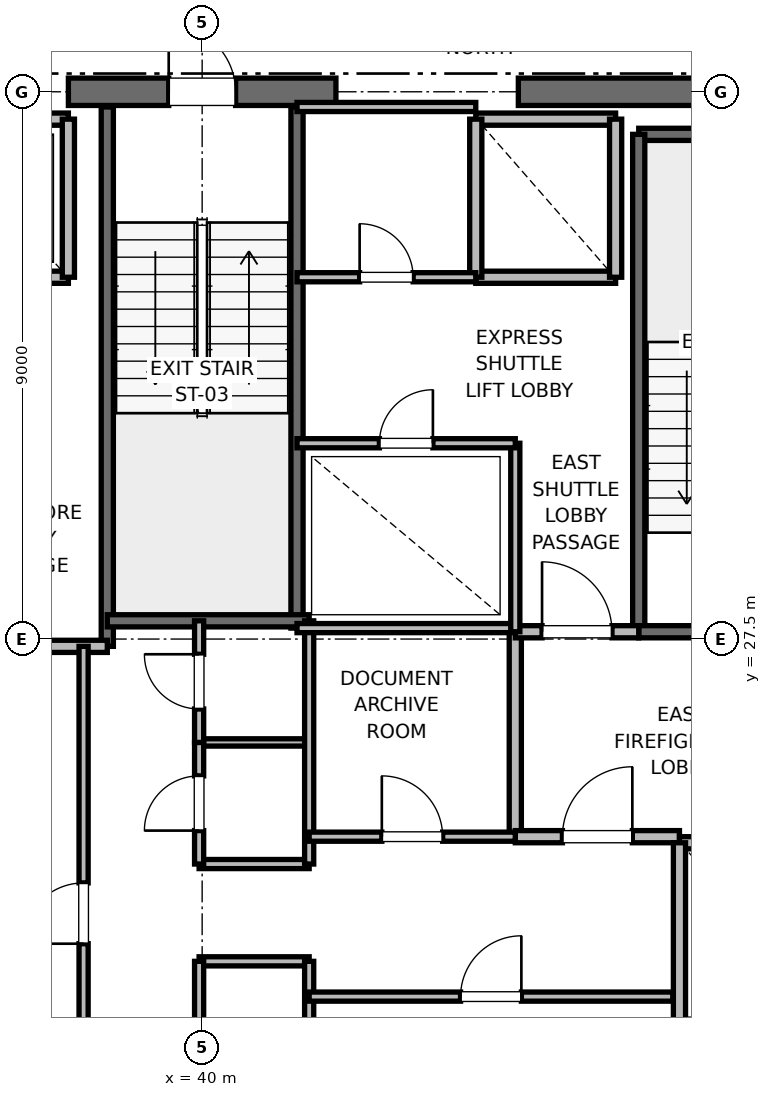
"""IFC4 building model, lengths in metres.
Left out: names, types, materials, properties, quantities, classifications, styles, units other than length and angle.
Written with IfcOpenShell. Run it as: python <this file> out.ifc"""

import sys

from ifc_helpers import new_model, si_unit, direction, frame, frame_2d, origin, place, context, subcontext, project, spatial, rectangle, extrude, element, fill, save


model = new_model("IFC4")
c1 = context("Model", 3, precision=1e-05, world=origin(), true_north=direction((0.0, 1.0)))
c2 = subcontext(c1, "Body", "Model", "MODEL_VIEW")
j1 = project(units=[si_unit("LENGTHUNIT", "METRE"), si_unit("PLANEANGLEUNIT", "RADIAN")], contexts=[c1])
p1 = place(None, origin())
s1 = spatial("IfcSite", under=j1, at=p1, CompositionType="ELEMENT")
p2 = place(p1, origin())
s2 = spatial("IfcBuilding", under=s1, at=p2, CompositionType="ELEMENT")
p3 = place(p2, frame((0.0, 0.0, 287.2)))
s3 = spatial("IfcBuildingStorey", under=s2, at=p3, CompositionType="ELEMENT", Elevation=287.2)
p4 = place(p3, frame((37.8, 36.5, 0.0), z_axis=(0.0, 0.0, 1.0), x_axis=(1.0, 0.0, 0.0)))
e1 = element("IfcWall", 1, at=p4, inside=s3, PredefinedType="SHEAR", context=c2, shape_type="SweptSolid", body=[
    extrude(rectangle(XDim=4.4, YDim=0.45, at=frame_2d((2.2, 0.0))), origin(), (0.0, 0.0, 1.0), 3.785),
])
p5 = place(p4, frame((1.65, 0.0, 0.0)))
e2 = element("IfcOpeningElement", 2, at=p5, cuts=e1, PredefinedType="OPENING", context=c2, shape_type="SweptSolid", body=[
    extrude(rectangle(XDim=1.1, YDim=2.15, at=frame_2d((0.55, 1.075))), frame((0.0, 0.225, 0.0), z_axis=(0.0, -1.0, 0.0), x_axis=(1.0, 0.0, 0.0)), (0.0, 0.0, 1.0), 0.45),
])
p6 = place(p3, frame((45.2, 36.5, 0.0), z_axis=(0.0, 0.0, 1.0), x_axis=(1.0, 0.0, 0.0)))
e3 = element("IfcWall", 3, at=p6, inside=s3, PredefinedType="SHEAR", context=c2, shape_type="SweptSolid", body=[
    extrude(rectangle(XDim=5.8, YDim=0.45, at=frame_2d((2.9, 0.0))), origin(), (0.0, 0.0, 1.0), 3.785),
])
p7 = place(p3, frame((47.18, 35.8, 0.0), z_axis=(0.0, 0.0, 1.0), x_axis=(1.0, 0.0, 0.0)))
e4 = element("IfcWall", 4, at=p7, inside=s3, PredefinedType="SOLIDWALL", context=c2, shape_type="SweptSolid", body=[
    extrude(rectangle(XDim=3.12, YDim=0.2, at=frame_2d((1.56, 0.0))), origin(), (0.0, 0.0, 1.0), 3.785),
])
p8 = place(p3, frame((47.18, 27.62, 0.0), z_axis=(0.0, 0.0, 1.0), x_axis=(0.0, 1.0, 0.0)))
e5 = element("IfcWall", 5, at=p8, inside=s3, PredefinedType="SOLIDWALL", context=c2, shape_type="SweptSolid", body=[
    extrude(rectangle(XDim=8.18, YDim=0.2, at=frame_2d((4.09, 0.0))), origin(), (0.0, 0.0, 1.0), 3.785),
])
p9 = place(p3, frame((47.18, 27.62, 0.0), z_axis=(0.0, 0.0, 1.0), x_axis=(1.0, 0.0, 0.0)))
e6 = element("IfcWall", 6, at=p9, inside=s3, PredefinedType="SOLIDWALL", context=c2, shape_type="SweptSolid", body=[
    extrude(rectangle(XDim=3.12, YDim=0.2, at=frame_2d((1.56, 0.0))), origin(), (0.0, 0.0, 1.0), 3.785),
])
p10 = place(p9, frame((1.01, 0.0, 0.0)))
e7 = element("IfcOpeningElement", 7, at=p10, cuts=e6, PredefinedType="OPENING", context=c2, shape_type="SweptSolid", body=[
    extrude(rectangle(XDim=1.1, YDim=2.15, at=frame_2d((0.55, 1.075))), frame((0.0, 0.1, 0.0), z_axis=(0.0, -1.0, 0.0), x_axis=(1.0, 0.0, 0.0)), (0.0, 0.0, 1.0), 0.2),
])
p11 = place(p3, frame((38.44, 27.38, 0.0), z_axis=(0.0, 0.0, 1.0), x_axis=(0.0, 1.0, 0.0)))
e8 = element("IfcWall", 8, at=p11, inside=s3, PredefinedType="SOLIDWALL", context=c2, shape_type="SweptSolid", body=[
    extrude(rectangle(XDim=8.87, YDim=0.2, at=frame_2d((4.435, 0.0))), origin(), (0.0, 0.0, 1.0), 3.785),
])
p12 = place(p3, frame((41.56, 27.68, 0.0), z_axis=(0.0, 0.0, 1.0), x_axis=(0.0, 1.0, 0.0)))
e9 = element("IfcWall", 9, at=p12, inside=s3, PredefinedType="SOLIDWALL", context=c2, shape_type="SweptSolid", body=[
    extrude(rectangle(XDim=8.57, YDim=0.2, at=frame_2d((4.285, 0.0))), origin(), (0.0, 0.0, 1.0), 3.785),
])
p13 = place(p3, frame((38.44, 27.8, 0.0), z_axis=(0.0, 0.0, 1.0), x_axis=(1.0, 0.0, 0.0)))
e10 = element("IfcWall", 10, at=p13, inside=s3, PredefinedType="SOLIDWALL", context=c2, shape_type="SweptSolid", body=[
    extrude(rectangle(XDim=3.32, YDim=0.2, at=frame_2d((1.66, 0.0))), origin(), (0.0, 0.0, 1.0), 3.785),
])
p14 = place(p3, frame((32.82, 27.38, 0.0), z_axis=(0.0, 0.0, 1.0), x_axis=(1.0, 0.0, 0.0)))
e11 = element("IfcWall", 11, at=p14, inside=s3, PredefinedType="PARTITIONING", context=c2, shape_type="SweptSolid", body=[
    extrude(rectangle(XDim=5.62, YDim=0.2, at=frame_2d((2.81, 0.0))), origin(), (0.0, 0.0, 1.0), 3.785),
])
p15 = place(p3, frame((45.15, 24.25, 0.0), z_axis=(0.0, 0.0, 1.0), x_axis=(0.0, 1.0, 0.0)))
e12 = element("IfcWall", 12, at=p15, inside=s3, PredefinedType="PARTITIONING", context=c2, shape_type="SweptSolid", body=[
    extrude(rectangle(XDim=3.37, YDim=0.2, at=frame_2d((1.685, 0.0))), origin(), (0.0, 0.0, 1.0), 3.785),
])
p16 = place(p3, frame((45.15, 24.25, 0.0), z_axis=(0.0, 0.0, 1.0), x_axis=(1.0, 0.0, 0.0)))
e13 = element("IfcWall", 13, at=p16, inside=s3, PredefinedType="PARTITIONING", context=c2, shape_type="SweptSolid", body=[
    extrude(rectangle(XDim=2.7, YDim=0.2, at=frame_2d((1.35, 0.0))), origin(), (0.0, 0.0, 1.0), 3.785),
])
p17 = place(p16, frame((0.775, 0.0, 0.0)))
e14 = element("IfcOpeningElement", 14, at=p17, cuts=e13, PredefinedType="OPENING", context=c2, shape_type="SweptSolid", body=[
    extrude(rectangle(XDim=1.15, YDim=2.2, at=frame_2d((0.575, 1.1))), frame((0.0, 0.1, 0.0), z_axis=(0.0, -1.0, 0.0), x_axis=(1.0, 0.0, 0.0)), (0.0, 0.0, 1.0), 0.2),
])
p18 = place(p3, frame((45.15, 27.62, 0.0), z_axis=(0.0, 0.0, 1.0), x_axis=(1.0, 0.0, 0.0)))
e15 = element("IfcWall", 15, at=p18, inside=s3, PredefinedType="PARTITIONING", context=c2, shape_type="SweptSolid", body=[
    extrude(rectangle(XDim=2.03, YDim=0.2, at=frame_2d((1.015, 0.0))), origin(), (0.0, 0.0, 1.0), 3.785),
])
p19 = place(p18, frame((0.44, 0.0, 0.0)))
e16 = element("IfcOpeningElement", 16, at=p19, cuts=e15, PredefinedType="OPENING", context=c2, shape_type="SweptSolid", body=[
    extrude(rectangle(XDim=1.15, YDim=2.2, at=frame_2d((0.575, 1.1))), frame((0.0, 0.1, 0.0), z_axis=(0.0, -1.0, 0.0), x_axis=(1.0, 0.0, 0.0)), (0.0, 0.0, 1.0), 0.2),
])
p20 = place(p3, frame((50.45, 24.15, 0.0), z_axis=(0.0, 0.0, 1.0), x_axis=(-1.0, 0.0, 0.0)))
e17 = element("IfcWall", 17, at=p20, inside=s3, PredefinedType="SOLIDWALL", context=c2, shape_type="SweptSolid", body=[
    extrude(rectangle(XDim=2.6, YDim=0.2, at=frame_2d((1.3, 0.0))), origin(), (0.0, 0.0, 1.0), 2.865),
])
p21 = place(p20, frame((0.75, 0.0, 0.0)))
e18 = element("IfcOpeningElement", 18, at=p21, cuts=e17, PredefinedType="OPENING", context=c2, shape_type="SweptSolid", body=[
    extrude(rectangle(XDim=1.1, YDim=2.2, at=frame_2d((0.55, 1.1))), frame((0.0, 0.1, 0.0), z_axis=(0.0, -1.0, 0.0), x_axis=(1.0, 0.0, 0.0)), (0.0, 0.0, 1.0), 0.2),
])
p22 = place(p3, frame((47.85, 24.15, 0.0), z_axis=(0.0, 0.0, 1.0), x_axis=(0.0, -1.0, 0.0)))
e19 = element("IfcWall", 19, at=p22, inside=s3, PredefinedType="SOLIDWALL", context=c2, shape_type="SweptSolid", body=[
    extrude(rectangle(XDim=3.0, YDim=0.2, at=frame_2d((1.5, 0.0))), origin(), (0.0, 0.0, 1.0), 3.785),
])
p23 = place(p3, frame((35.5, 33.45, 0.0), z_axis=(0.0, 0.0, 1.0), x_axis=(1.0, 0.0, 0.0)))
e20 = element("IfcWall", 20, at=p23, inside=s3, PredefinedType="SOLIDWALL", context=c2, shape_type="SweptSolid", body=[
    extrude(rectangle(XDim=2.3, YDim=0.2, at=frame_2d((1.15, 0.0))), origin(), (0.0, 0.0, 1.0), 3.785),
])
p24 = place(p23, frame((0.6, 0.0, 0.0)))
e21 = element("IfcOpeningElement", 21, at=p24, cuts=e20, PredefinedType="OPENING", context=c2, shape_type="SweptSolid", body=[
    extrude(rectangle(XDim=1.1, YDim=2.2, at=frame_2d((0.55, 1.1))), frame((0.0, 0.1, 0.0), z_axis=(0.0, -1.0, 0.0), x_axis=(1.0, 0.0, 0.0)), (0.0, 0.0, 1.0), 0.2),
])
p25 = place(p3, frame((37.8, 36.05, 0.0), z_axis=(0.0, 0.0, 1.0), x_axis=(-1.0, 0.0, 0.0)))
e22 = element("IfcWall", 22, at=p25, inside=s3, PredefinedType="SOLIDWALL", context=c2, shape_type="SweptSolid", body=[
    extrude(rectangle(XDim=2.3, YDim=0.2, at=frame_2d((1.15, 0.0))), origin(), (0.0, 0.0, 1.0), 2.865),
])
p26 = place(p3, frame((37.8, 33.45, 0.0), z_axis=(0.0, 0.0, 1.0), x_axis=(0.0, 1.0, 0.0)))
e23 = element("IfcWall", 23, at=p26, inside=s3, PredefinedType="SOLIDWALL", context=c2, shape_type="SweptSolid", body=[
    extrude(rectangle(XDim=2.6, YDim=0.2, at=frame_2d((1.3, 0.0))), origin(), (0.0, 0.0, 1.0), 2.865),
])
p27 = place(p3, frame((44.5, 33.45, 0.0), z_axis=(0.0, 0.0, 1.0), x_axis=(1.0, 0.0, 0.0)))
e24 = element("IfcWall", 24, at=p27, inside=s3, PredefinedType="SOLIDWALL", context=c2, shape_type="SweptSolid", body=[
    extrude(rectangle(XDim=2.3, YDim=0.2, at=frame_2d((1.15, 0.0))), origin(), (0.0, 0.0, 1.0), 3.785),
])
p28 = place(p3, frame((46.8, 36.05, 0.0), z_axis=(0.0, 0.0, 1.0), x_axis=(-1.0, 0.0, 0.0)))
e25 = element("IfcWall", 25, at=p28, inside=s3, PredefinedType="SOLIDWALL", context=c2, shape_type="SweptSolid", body=[
    extrude(rectangle(XDim=2.3, YDim=0.2, at=frame_2d((1.15, 0.0))), origin(), (0.0, 0.0, 1.0), 2.865),
])
p29 = place(p3, frame((44.5, 36.05, 0.0), z_axis=(0.0, 0.0, 1.0), x_axis=(0.0, -1.0, 0.0)))
e26 = element("IfcWall", 26, at=p29, inside=s3, PredefinedType="SOLIDWALL", context=c2, shape_type="SweptSolid", body=[
    extrude(rectangle(XDim=2.6, YDim=0.2, at=frame_2d((1.3, 0.0))), origin(), (0.0, 0.0, 1.0), 2.865),
])
p30 = place(p3, frame((46.8, 33.45, 0.0), z_axis=(0.0, 0.0, 1.0), x_axis=(0.0, 1.0, 0.0)))
e27 = element("IfcWall", 27, at=p30, inside=s3, PredefinedType="SOLIDWALL", context=c2, shape_type="SweptSolid", body=[
    extrude(rectangle(XDim=2.6, YDim=0.2, at=frame_2d((1.3, 0.0))), origin(), (0.0, 0.0, 1.0), 3.785),
])
for number, where, z_axis, x_axis in (
    (28, (39.95, 22.2, 0.0), (0.0, 0.0, 1.0), (1.0, 0.0, 0.0)),
    (29, (39.95, 23.8, 0.0), (0.0, 0.0, 1.0), (1.0, 0.0, 0.0)),
):
    element("IfcWall", number, at=place(p3, frame(where, z_axis=z_axis, x_axis=x_axis)), inside=s3, PredefinedType="PARTITIONING", context=c2, shape_type="SweptSolid", body=[
        extrude(rectangle(XDim=1.81, YDim=0.15, at=frame_2d((0.905, 0.0))), origin(), (0.0, 0.0, 1.0), 2.85),
    ])
p31 = place(p3, frame((39.95, 25.8, 0.0), z_axis=(0.0, 0.0, 1.0), x_axis=(1.0, 0.0, 0.0)))
e30 = element("IfcWall", 30, at=p31, inside=s3, PredefinedType="PARTITIONING", context=c2, shape_type="SweptSolid", body=[
    extrude(rectangle(XDim=1.81, YDim=0.12, at=frame_2d((0.905, 0.0))), origin(), (0.0, 0.0, 1.0), 2.85),
])
p32 = place(p3, frame((41.76, 18.6, 0.0), z_axis=(0.0, 0.0, 1.0), x_axis=(0.0, 1.0, 0.0)))
e31 = element("IfcWall", 31, at=p32, inside=s3, PredefinedType="PARTITIONING", context=c2, shape_type="SweptSolid", body=[
    extrude(rectangle(XDim=3.6, YDim=0.15, at=frame_2d((1.8, 0.0))), origin(), (0.0, 0.0, 1.0), 2.85),
])
p33 = place(p3, frame((41.76, 23.8, 0.0), z_axis=(0.0, 0.0, 1.0), x_axis=(0.0, 1.0, 0.0)))
e32 = element("IfcWall", 32, at=p33, inside=s3, PredefinedType="PARTITIONING", context=c2, shape_type="SweptSolid", body=[
    extrude(rectangle(XDim=4.0, YDim=0.15, at=frame_2d((2.0, 0.0))), origin(), (0.0, 0.0, 1.0), 2.85),
])
p34 = place(p3, frame((39.95, 19.2, 0.0), z_axis=(0.0, 0.0, 1.0), x_axis=(0.0, 1.0, 0.0)))
e33 = element("IfcWall", 33, at=p34, inside=s3, PredefinedType="PARTITIONING", context=c2, shape_type="SweptSolid", body=[
    extrude(rectangle(XDim=3.0, YDim=0.15, at=frame_2d((1.5, 0.0))), origin(), (0.0, 0.0, 1.0), 2.85),
])
p35 = place(p34, frame((1.05, 0.0, 0.0)))
e34 = element("IfcOpeningElement", 34, at=p35, cuts=e33, PredefinedType="OPENING", context=c2, shape_type="SweptSolid", body=[
    extrude(rectangle(XDim=0.9, YDim=2.1, at=frame_2d((0.45, 1.05))), frame((0.0, 0.075, 0.0), z_axis=(0.0, -1.0, 0.0), x_axis=(1.0, 0.0, 0.0)), (0.0, 0.0, 1.0), 0.15),
])
p36 = place(p3, frame((39.95, 23.8, 0.0), z_axis=(0.0, 0.0, 1.0), x_axis=(0.0, 1.0, 0.0)))
e35 = element("IfcWall", 35, at=p36, inside=s3, PredefinedType="PARTITIONING", context=c2, shape_type="SweptSolid", body=[
    extrude(rectangle(XDim=2.0, YDim=0.15, at=frame_2d((1.0, 0.0))), origin(), (0.0, 0.0, 1.0), 2.85),
])
p37 = place(p36, frame((0.55, 0.0, 0.0)))
e36 = element("IfcOpeningElement", 36, at=p37, cuts=e35, PredefinedType="OPENING", context=c2, shape_type="SweptSolid", body=[
    extrude(rectangle(XDim=0.9, YDim=2.1, at=frame_2d((0.45, 1.05))), frame((0.0, 0.075, 0.0), z_axis=(0.0, -1.0, 0.0), x_axis=(1.0, 0.0, 0.0)), (0.0, 0.0, 1.0), 0.15),
])
p38 = place(p3, frame((39.95, 25.8, 0.0), z_axis=(0.0, 0.0, 1.0), x_axis=(0.0, 1.0, 0.0)))
e37 = element("IfcWall", 37, at=p38, inside=s3, PredefinedType="PARTITIONING", context=c2, shape_type="SweptSolid", body=[
    extrude(rectangle(XDim=2.0, YDim=0.15, at=frame_2d((1.0, 0.0))), origin(), (0.0, 0.0, 1.0), 2.85),
])
p39 = place(p38, frame((0.55, 0.0, 0.0)))
e38 = element("IfcOpeningElement", 38, at=p39, cuts=e37, PredefinedType="OPENING", context=c2, shape_type="SweptSolid", body=[
    extrude(rectangle(XDim=0.9, YDim=2.1, at=frame_2d((0.45, 1.05))), frame((0.0, 0.075, 0.0), z_axis=(0.0, -1.0, 0.0), x_axis=(1.0, 0.0, 0.0)), (0.0, 0.0, 1.0), 0.15),
])
p40 = place(p3, frame((38.05, 18.6, 0.0), z_axis=(0.0, 0.0, 1.0), x_axis=(0.0, 1.0, 0.0)))
e39 = element("IfcWall", 39, at=p40, inside=s3, PredefinedType="PARTITIONING", context=c2, shape_type="SweptSolid", body=[
    extrude(rectangle(XDim=8.78, YDim=0.15, at=frame_2d((4.39, 0.0))), origin(), (0.0, 0.0, 1.0), 2.85),
])
p41 = place(p40, frame((3.89, 0.0, 0.0)))
e40 = element("IfcOpeningElement", 40, at=p41, cuts=e39, PredefinedType="OPENING", context=c2, shape_type="SweptSolid", body=[
    extrude(rectangle(XDim=1.0, YDim=2.15, at=frame_2d((0.5, 1.075))), frame((0.0, 0.075, 0.0), z_axis=(0.0, -1.0, 0.0), x_axis=(1.0, 0.0, 0.0)), (0.0, 0.0, 1.0), 0.15),
])
p42 = place(p3, frame((41.56, 27.68, 0.0), z_axis=(0.0, 0.0, 1.0), x_axis=(1.0, 0.0, 0.0)))
e41 = element("IfcWall", 41, at=p42, inside=s3, PredefinedType="PARTITIONING", context=c2, shape_type="SweptSolid", body=[
    extrude(rectangle(XDim=3.59, YDim=0.15, at=frame_2d((1.795, 0.0))), origin(), (0.0, 0.0, 1.0), 2.85),
])
p43 = place(p3, frame((41.76, 21.62, 0.0), z_axis=(0.0, 0.0, 1.0), x_axis=(1.0, 0.0, 0.0)))
e42 = element("IfcWall", 42, at=p43, inside=s3, PredefinedType="PARTITIONING", context=c2, shape_type="SweptSolid", body=[
    extrude(rectangle(XDim=5.98, YDim=0.15, at=frame_2d((2.99, 0.0))), origin(), (0.0, 0.0, 1.0), 2.85),
])
p44 = place(p43, frame((2.49, 0.0, 0.0)))
e43 = element("IfcOpeningElement", 43, at=p44, cuts=e42, PredefinedType="OPENING", context=c2, shape_type="SweptSolid", body=[
    extrude(rectangle(XDim=1.0, YDim=2.15, at=frame_2d((0.5, 1.075))), frame((0.0, 0.075, 0.0), z_axis=(0.0, -1.0, 0.0), x_axis=(1.0, 0.0, 0.0)), (0.0, 0.0, 1.0), 0.15),
])
p45 = place(p3, frame((41.76, 24.25, 0.0), z_axis=(0.0, 0.0, 1.0), x_axis=(1.0, 0.0, 0.0)))
e44 = element("IfcWall", 44, at=p45, inside=s3, PredefinedType="PARTITIONING", context=c2, shape_type="SweptSolid", body=[
    extrude(rectangle(XDim=3.39, YDim=0.15, at=frame_2d((1.695, 0.0))), origin(), (0.0, 0.0, 1.0), 2.85),
])
p46 = place(p45, frame((1.195, 0.0, 0.0)))
e45 = element("IfcOpeningElement", 45, at=p46, cuts=e44, PredefinedType="OPENING", context=c2, shape_type="SweptSolid", body=[
    extrude(rectangle(XDim=1.0, YDim=2.15, at=frame_2d((0.5, 1.075))), frame((0.0, 0.075, 0.0), z_axis=(0.0, -1.0, 0.0), x_axis=(1.0, 0.0, 0.0)), (0.0, 0.0, 1.0), 0.15),
])
p47 = place(p3, frame((45.15, 27.62, 0.0), z_axis=(0.0, 0.0, 1.0), x_axis=(0.0, 1.0, 0.0)))
e46 = element("IfcWall", 46, at=p47, inside=s3, PredefinedType="PARTITIONING", context=c2, shape_type="SweptSolid", body=[
    extrude(rectangle(XDim=3.1, YDim=0.15, at=frame_2d((1.55, 0.0))), origin(), (0.0, 0.0, 1.0), 2.85),
])
p48 = place(p3, frame((41.56, 30.72, 0.0), z_axis=(0.0, 0.0, 1.0), x_axis=(1.0, 0.0, 0.0)))
e47 = element("IfcWall", 47, at=p48, inside=s3, PredefinedType="PARTITIONING", context=c2, shape_type="SweptSolid", body=[
    extrude(rectangle(XDim=3.59, YDim=0.15, at=frame_2d((1.795, 0.0))), origin(), (0.0, 0.0, 1.0), 2.85),
])
p49 = place(p48, frame((1.355, 0.0, 0.0)))
e48 = element("IfcOpeningElement", 48, at=p49, cuts=e47, PredefinedType="OPENING", context=c2, shape_type="SweptSolid", body=[
    extrude(rectangle(XDim=0.88, YDim=2.1, at=frame_2d((0.44, 1.05))), frame((0.0, 0.075, 0.0), z_axis=(0.0, -1.0, 0.0), x_axis=(1.0, 0.0, 0.0)), (0.0, 0.0, 1.0), 0.15),
])
p50 = place(p3, frame((41.56, 36.25, 0.0), z_axis=(0.0, 0.0, 1.0), x_axis=(1.0, 0.0, 0.0)))
e49 = element("IfcWall", 49, at=p50, inside=s3, PredefinedType="PARTITIONING", context=c2, shape_type="SweptSolid", body=[
    extrude(rectangle(XDim=2.94, YDim=0.15, at=frame_2d((1.47, 0.0))), origin(), (0.0, 0.0, 1.0), 2.85),
])
p51 = place(p3, frame((41.56, 33.45, 0.0), z_axis=(0.0, 0.0, 1.0), x_axis=(1.0, 0.0, 0.0)))
e50 = element("IfcWall", 50, at=p51, inside=s3, PredefinedType="PARTITIONING", context=c2, shape_type="SweptSolid", body=[
    extrude(rectangle(XDim=2.94, YDim=0.15, at=frame_2d((1.47, 0.0))), origin(), (0.0, 0.0, 1.0), 2.85),
])
p52 = place(p51, frame((1.03, 0.0, 0.0)))
e51 = element("IfcOpeningElement", 51, at=p52, cuts=e50, PredefinedType="OPENING", context=c2, shape_type="SweptSolid", body=[
    extrude(rectangle(XDim=0.88, YDim=2.1, at=frame_2d((0.44, 1.05))), frame((0.0, 0.075, 0.0), z_axis=(0.0, -1.0, 0.0), x_axis=(1.0, 0.0, 0.0)), (0.0, 0.0, 1.0), 0.15),
])
p53 = place(p5, origin())
e52 = element("IfcDoor", 52, at=p53, inside=s3, OperationType="SINGLE_SWING_LEFT", PredefinedType="DOOR", context=c2, shape_type="SweptSolid", body=[
    extrude(rectangle(XDim=1.1, YDim=2.15, at=frame_2d((0.55, 1.075))), frame((0.0, 0.025, 0.0), z_axis=(0.0, -1.0, 0.0), x_axis=(1.0, 0.0, 0.0)), (0.0, 0.0, 1.0), 0.05),
])
fill(e2, e52)
p54 = place(p17, origin())
e53 = element("IfcDoor", 53, at=p54, inside=s3, OperationType="SINGLE_SWING_RIGHT", PredefinedType="DOOR", context=c2, shape_type="SweptSolid", body=[
    extrude(rectangle(XDim=1.15, YDim=2.2, at=frame_2d((0.575, 1.1))), frame((0.0, 0.025, 0.0), z_axis=(0.0, -1.0, 0.0), x_axis=(1.0, 0.0, 0.0)), (0.0, 0.0, 1.0), 0.05),
])
fill(e14, e53)
p55 = place(p19, origin())
e54 = element("IfcDoor", 54, at=p55, inside=s3, OperationType="SINGLE_SWING_LEFT", PredefinedType="DOOR", context=c2, shape_type="SweptSolid", body=[
    extrude(rectangle(XDim=1.15, YDim=2.2, at=frame_2d((0.575, 1.1))), frame((0.0, 0.025, 0.0), z_axis=(0.0, -1.0, 0.0), x_axis=(1.0, 0.0, 0.0)), (0.0, 0.0, 1.0), 0.05),
])
fill(e16, e54)
p56 = place(p37, origin())
e55 = element("IfcDoor", 55, at=p56, inside=s3, OperationType="SINGLE_SWING_LEFT", PredefinedType="DOOR", context=c2, shape_type="SweptSolid", body=[
    extrude(rectangle(XDim=0.9, YDim=2.1, at=frame_2d((0.45, 1.05))), frame((0.0, 0.025, 0.0), z_axis=(0.0, -1.0, 0.0), x_axis=(1.0, 0.0, 0.0)), (0.0, 0.0, 1.0), 0.05),
])
fill(e36, e55)
p57 = place(p39, origin())
e56 = element("IfcDoor", 56, at=p57, inside=s3, OperationType="SINGLE_SWING_RIGHT", PredefinedType="DOOR", context=c2, shape_type="SweptSolid", body=[
    extrude(rectangle(XDim=0.9, YDim=2.1, at=frame_2d((0.45, 1.05))), frame((0.0, 0.025, 0.0), z_axis=(0.0, -1.0, 0.0), x_axis=(1.0, 0.0, 0.0)), (0.0, 0.0, 1.0), 0.05),
])
fill(e38, e56)
p58 = place(p41, origin())
e57 = element("IfcDoor", 57, at=p58, inside=s3, OperationType="SINGLE_SWING_LEFT", PredefinedType="DOOR", context=c2, shape_type="SweptSolid", body=[
    extrude(rectangle(XDim=1.0, YDim=2.15, at=frame_2d((0.5, 1.075))), frame((0.0, 0.025, 0.0), z_axis=(0.0, -1.0, 0.0), x_axis=(1.0, 0.0, 0.0)), (0.0, 0.0, 1.0), 0.05),
])
fill(e40, e57)
p59 = place(p44, origin())
e58 = element("IfcDoor", 58, at=p59, inside=s3, OperationType="SINGLE_SWING_RIGHT", PredefinedType="DOOR", context=c2, shape_type="SweptSolid", body=[
    extrude(rectangle(XDim=1.0, YDim=2.15, at=frame_2d((0.5, 1.075))), frame((0.0, 0.025, 0.0), z_axis=(0.0, -1.0, 0.0), x_axis=(1.0, 0.0, 0.0)), (0.0, 0.0, 1.0), 0.05),
])
fill(e43, e58)
p60 = place(p46, origin())
e59 = element("IfcDoor", 59, at=p60, inside=s3, OperationType="SINGLE_SWING_LEFT", PredefinedType="DOOR", context=c2, shape_type="SweptSolid", body=[
    extrude(rectangle(XDim=1.0, YDim=2.15, at=frame_2d((0.5, 1.075))), frame((0.0, 0.025, 0.0), z_axis=(0.0, -1.0, 0.0), x_axis=(1.0, 0.0, 0.0)), (0.0, 0.0, 1.0), 0.05),
])
fill(e45, e59)
p61 = place(p49, origin())
e60 = element("IfcDoor", 60, at=p61, inside=s3, OperationType="SINGLE_SWING_RIGHT", PredefinedType="DOOR", context=c2, shape_type="SweptSolid", body=[
    extrude(rectangle(XDim=0.88, YDim=2.1, at=frame_2d((0.44, 1.05))), frame((0.0, 0.025, 0.0), z_axis=(0.0, -1.0, 0.0), x_axis=(1.0, 0.0, 0.0)), (0.0, 0.0, 1.0), 0.05),
])
fill(e48, e60)
p62 = place(p52, origin())
e61 = element("IfcDoor", 61, at=p62, inside=s3, OperationType="SINGLE_SWING_LEFT", PredefinedType="DOOR", context=c2, shape_type="SweptSolid", body=[
    extrude(rectangle(XDim=0.88, YDim=2.1, at=frame_2d((0.44, 1.05))), frame((0.0, 0.025, 0.0), z_axis=(0.0, -1.0, 0.0), x_axis=(1.0, 0.0, 0.0)), (0.0, 0.0, 1.0), 0.05),
])
fill(e51, e61)
save(model, sys.argv[1])
